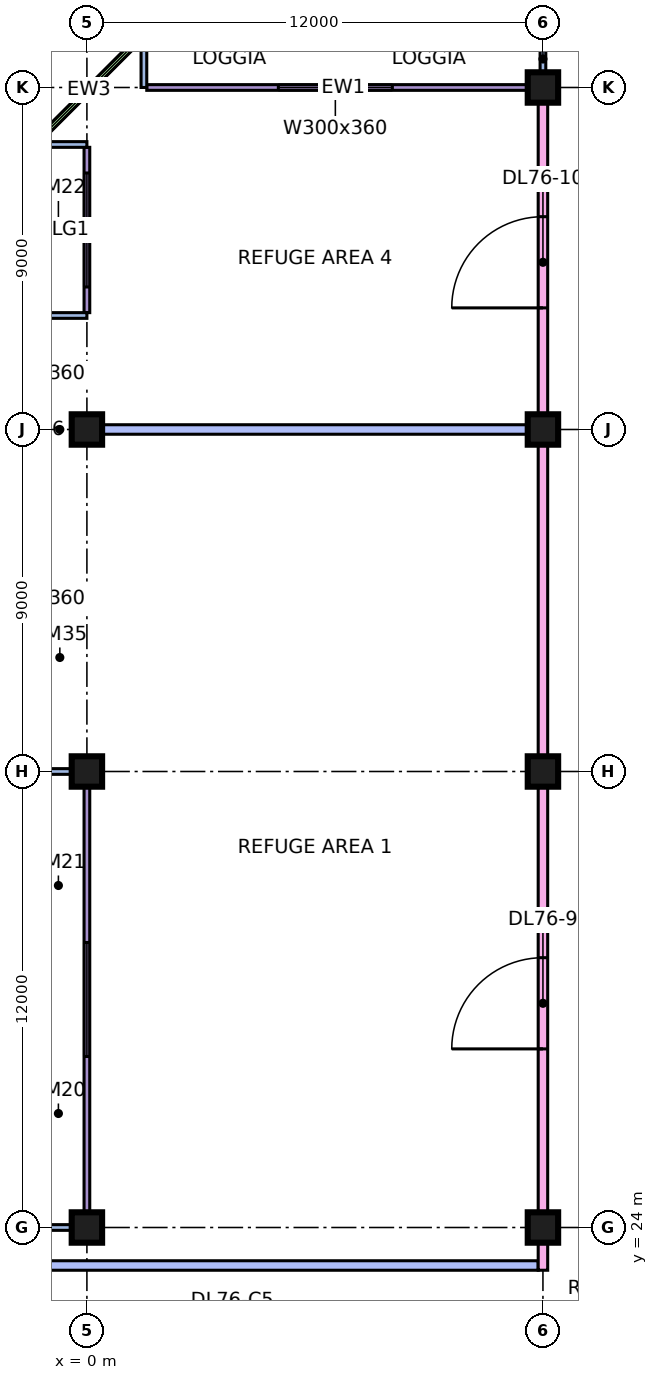
"""IFC4 building model, lengths in metres.
Left out: names, types, materials, properties, quantities, classifications, styles, units other than length and angle.
Written with IfcOpenShell. Run it as: python <this file> out.ifc"""

import sys

from ifc_helpers import new_model, si_unit, direction, frame, frame_2d, origin, origin_2d, place, context, subcontext, project, spatial, rectangle, extrude, element, fill, save


model = new_model("IFC4")
c1 = context("Model", 3, precision=1e-05, world=origin(), true_north=direction((0.0, 1.0)))
c2 = subcontext(c1, "Body", "Model", "MODEL_VIEW")
j1 = project(units=[si_unit("LENGTHUNIT", "METRE"), si_unit("PLANEANGLEUNIT", "RADIAN")], contexts=[c1])
p1 = place(None, origin())
s1 = spatial("IfcSite", under=j1, at=p1, CompositionType="ELEMENT")
p2 = place(p1, origin())
s2 = spatial("IfcBuilding", under=s1, at=p2, CompositionType="ELEMENT")
p3 = place(p2, frame((0.0, 0.0, 322.15)))
s3 = spatial("IfcBuildingStorey", under=s2, at=p3, CompositionType="ELEMENT", Elevation=322.15)
for number, where, z_axis, x_axis in (
    (1, (0.0, 24.0, 0.0), (0.0, 0.0, 1.0), (1.0, 0.0, 0.0)),
    (2, (0.0, 36.0, 0.0), (0.0, 0.0, 1.0), (1.0, 0.0, 0.0)),
):
    element("IfcColumn", number, at=place(p3, frame(where, z_axis=z_axis, x_axis=x_axis)), inside=s3, PredefinedType="COLUMN", context=c2, shape_type="SweptSolid", body=[
        extrude(rectangle(XDim=0.8, YDim=0.8, at=origin_2d()), origin(), (0.0, 0.0, 1.0), 5.5),
    ])
p4 = place(p3, frame((0.0, 45.0, 0.0), z_axis=(0.0, 0.0, 1.0), x_axis=(1.0, 0.0, 0.0)))
e3 = element("IfcColumn", 3, at=p4, inside=s3, PredefinedType="COLUMN", context=c2, shape_type="SweptSolid", body=[
    extrude(rectangle(XDim=0.8, YDim=0.8, at=origin_2d()), origin(), (0.0, 0.0, 1.0), 5.5),
])
for number, where, z_axis, x_axis in (
    (4, (12.0, 24.0, 0.0), (0.0, 0.0, 1.0), (1.0, 0.0, 0.0)),
    (5, (12.0, 36.0, 0.0), (0.0, 0.0, 1.0), (1.0, 0.0, 0.0)),
    (6, (12.0, 45.0, 0.0), (0.0, 0.0, 1.0), (1.0, 0.0, 0.0)),
    (7, (12.0, 54.0, 0.0), (0.0, 0.0, 1.0), (1.0, 0.0, 0.0)),
):
    element("IfcColumn", number, at=place(p3, frame(where, z_axis=z_axis, x_axis=x_axis)), inside=s3, PredefinedType="COLUMN", context=c2, shape_type="SweptSolid", body=[
        extrude(rectangle(XDim=0.8, YDim=0.8, at=origin_2d()), origin(), (0.0, 0.0, 1.0), 5.5),
    ])
p5 = place(p3, frame((11.925, 54.0, 0.0), z_axis=(0.0, 0.0, 1.0), x_axis=(-1.0, 0.0, 0.0)))
e8 = element("IfcWall", 8, at=p5, inside=s3, PredefinedType="SOLIDWALL", context=c2, shape_type="SweptSolid", body=[
    extrude(rectangle(XDim=10.35, YDim=0.15, at=frame_2d((5.175, 0.0))), origin(), (0.0, 0.0, 1.0), 5.05),
])
p6 = place(p5, frame((3.887, 0.0, 0.45)))
e9 = element("IfcOpeningElement", 9, at=p6, cuts=e8, PredefinedType="OPENING", context=c2, shape_type="SweptSolid", body=[
    extrude(rectangle(XDim=3.0, YDim=3.6, at=frame_2d((1.5, 1.8))), frame((0.0, 0.085, 0.0), z_axis=(0.0, -1.0, 0.0), x_axis=(1.0, 0.0, 0.0)), (0.0, 0.0, 1.0), 0.17),
])
for number, where, z_axis, x_axis in (
    (10, (12.0, 55.5, 0.0), (0.0, 0.0, 1.0), (0.0, -1.0, 0.0)),
    (11, (1.5, 55.5, 0.0), (0.0, 0.0, 1.0), (0.0, -1.0, 0.0)),
):
    element("IfcWall", number, at=place(p3, frame(where, z_axis=z_axis, x_axis=x_axis)), inside=s3, PredefinedType="SOLIDWALL", context=c2, shape_type="SweptSolid", body=[
        extrude(rectangle(XDim=1.5, YDim=0.15, at=frame_2d((0.75, 0.0))), origin(), (0.0, 0.0, 1.0), 5.05),
    ])
p7 = place(p3, frame((1.553, 55.447, 0.0), z_axis=(0.0, 0.0, 1.0), x_axis=(-0.707106781187, -0.707106781187, 0.0)))
e12 = element("IfcWall", 12, at=p7, inside=s3, PredefinedType="SOLIDWALL", context=c2, shape_type="SweptSolid", body=[
    extrude(rectangle(XDim=4.243, YDim=0.15, at=frame_2d((2.121, 0.0))), origin(), (0.0, 0.0, 1.0), 5.05),
])
p8 = place(p7, frame((0.621, 0.0, 0.45)))
e13 = element("IfcOpeningElement", 13, at=p8, cuts=e12, PredefinedType="OPENING", context=c2, shape_type="SweptSolid", body=[
    extrude(rectangle(XDim=3.0, YDim=3.6, at=frame_2d((1.5, 1.8))), frame((0.0, 0.085, 0.0), z_axis=(0.0, -1.0, 0.0), x_axis=(1.0, 0.0, 0.0)), (0.0, 0.0, 1.0), 0.17),
])
p9 = place(p3, frame((0.0, 52.425, 0.0), z_axis=(0.0, 0.0, 1.0), x_axis=(0.0, -1.0, 0.0)))
e14 = element("IfcWall", 14, at=p9, inside=s3, PredefinedType="SOLIDWALL", context=c2, shape_type="SweptSolid", body=[
    extrude(rectangle(XDim=4.35, YDim=0.15, at=frame_2d((2.175, 0.0))), origin(), (0.0, 0.0, 1.0), 5.05),
])
p10 = place(p9, frame((0.675, 0.0, 0.45)))
e15 = element("IfcOpeningElement", 15, at=p10, cuts=e14, PredefinedType="OPENING", context=c2, shape_type="SweptSolid", body=[
    extrude(rectangle(XDim=3.0, YDim=3.6, at=frame_2d((1.5, 1.8))), frame((0.0, 0.085, 0.0), z_axis=(0.0, -1.0, 0.0), x_axis=(1.0, 0.0, 0.0)), (0.0, 0.0, 1.0), 0.17),
])
for number, where, z_axis, x_axis in (
    (16, (-1.5, 52.5, 0.0), (0.0, 0.0, 1.0), (1.0, 0.0, 0.0)),
    (17, (-1.5, 48.0, 0.0), (0.0, 0.0, 1.0), (1.0, 0.0, 0.0)),
):
    element("IfcWall", number, at=place(p3, frame(where, z_axis=z_axis, x_axis=x_axis)), inside=s3, PredefinedType="SOLIDWALL", context=c2, shape_type="SweptSolid", body=[
        extrude(rectangle(XDim=1.5, YDim=0.15, at=frame_2d((0.75, 0.0))), origin(), (0.0, 0.0, 1.0), 5.05),
    ])
p11 = place(p3, frame((0.0, 35.925, 0.0), z_axis=(0.0, 0.0, 1.0), x_axis=(0.0, -1.0, 0.0)))
e18 = element("IfcWall", 18, at=p11, inside=s3, PredefinedType="SOLIDWALL", context=c2, shape_type="SweptSolid", body=[
    extrude(rectangle(XDim=11.85, YDim=0.15, at=frame_2d((5.925, 0.0))), origin(), (0.0, 0.0, 1.0), 5.05),
])
p12 = place(p11, frame((4.425, 0.0, 0.45)))
e19 = element("IfcOpeningElement", 19, at=p12, cuts=e18, PredefinedType="OPENING", context=c2, shape_type="SweptSolid", body=[
    extrude(rectangle(XDim=3.0, YDim=3.6, at=frame_2d((1.5, 1.8))), frame((0.0, 0.085, 0.0), z_axis=(0.0, -1.0, 0.0), x_axis=(1.0, 0.0, 0.0)), (0.0, 0.0, 1.0), 0.17),
])
for number, where, z_axis, x_axis in (
    (20, (-1.5, 36.0, 0.0), (0.0, 0.0, 1.0), (1.0, 0.0, 0.0)),
    (21, (-1.5, 24.0, 0.0), (0.0, 0.0, 1.0), (1.0, 0.0, 0.0)),
):
    element("IfcWall", number, at=place(p3, frame(where, z_axis=z_axis, x_axis=x_axis)), inside=s3, PredefinedType="SOLIDWALL", context=c2, shape_type="SweptSolid", body=[
        extrude(rectangle(XDim=1.5, YDim=0.15, at=frame_2d((0.75, 0.0))), origin(), (0.0, 0.0, 1.0), 5.05),
    ])
p13 = place(p3, frame((-1.35, 23.0, 0.0), z_axis=(0.0, 0.0, 1.0), x_axis=(1.0, 0.0, 0.0)))
e22 = element("IfcWall", 22, at=p13, inside=s3, PredefinedType="PARTITIONING", context=c2, shape_type="SweptSolid", body=[
    extrude(rectangle(XDim=13.225, YDim=0.25, at=frame_2d((6.613, 0.0))), origin(), (0.0, 0.0, 1.0), 5.05),
])
e23 = element("IfcWall", 23, at=p4, inside=s3, PredefinedType="PARTITIONING", context=c2, shape_type="SweptSolid", body=[
    extrude(rectangle(XDim=11.875, YDim=0.25, at=frame_2d((5.938, 0.0))), origin(), (0.0, 0.0, 1.0), 5.05),
])
p14 = place(p3, frame((12.0, 22.875, 0.0), z_axis=(0.0, 0.0, 1.0), x_axis=(0.0, 1.0, 0.0)))
e24 = element("IfcWall", 24, at=p14, inside=s3, PredefinedType="PARTITIONING", context=c2, shape_type="SweptSolid", body=[
    extrude(rectangle(XDim=31.125, YDim=0.25, at=frame_2d((15.562, 0.0))), origin(), (0.0, 0.0, 1.0), 2.45),
])
p15 = place(p14, frame((5.825, 0.0, 0.0)))
e25 = element("IfcOpeningElement", 25, at=p15, cuts=e24, PredefinedType="OPENING", context=c2, shape_type="SweptSolid", body=[
    extrude(rectangle(XDim=2.4, YDim=2.1, at=frame_2d((1.2, 1.05))), frame((0.0, 0.135, 0.0), z_axis=(0.0, -1.0, 0.0), x_axis=(1.0, 0.0, 0.0)), (0.0, 0.0, 1.0), 0.27),
])
p16 = place(p14, frame((25.325, 0.0, 0.0)))
e26 = element("IfcOpeningElement", 26, at=p16, cuts=e24, PredefinedType="OPENING", context=c2, shape_type="SweptSolid", body=[
    extrude(rectangle(XDim=2.4, YDim=2.1, at=frame_2d((1.2, 1.05))), frame((0.0, 0.135, 0.0), z_axis=(0.0, -1.0, 0.0), x_axis=(1.0, 0.0, 0.0)), (0.0, 0.0, 1.0), 0.27),
])
p17 = place(p6, origin())
e27 = element("IfcWindow", 27, at=p17, inside=s3, PartitioningType="SINGLE_PANEL", PredefinedType="WINDOW", context=c2, shape_type="SweptSolid", body=[
    extrude(rectangle(XDim=3.0, YDim=3.6, at=frame_2d((1.5, 1.8))), frame((0.0, 0.03, 0.0), z_axis=(0.0, -1.0, 0.0), x_axis=(1.0, 0.0, 0.0)), (0.0, 0.0, 1.0), 0.06),
])
fill(e9, e27)
p18 = place(p8, origin())
e28 = element("IfcWindow", 28, at=p18, inside=s3, PartitioningType="SINGLE_PANEL", PredefinedType="WINDOW", context=c2, shape_type="SweptSolid", body=[
    extrude(rectangle(XDim=3.0, YDim=3.6, at=frame_2d((1.5, 1.8))), frame((0.0, 0.03, 0.0), z_axis=(0.0, -1.0, 0.0), x_axis=(1.0, 0.0, 0.0)), (0.0, 0.0, 1.0), 0.06),
])
fill(e13, e28)
p19 = place(p10, origin())
e29 = element("IfcWindow", 29, at=p19, inside=s3, PartitioningType="SINGLE_PANEL", PredefinedType="WINDOW", context=c2, shape_type="SweptSolid", body=[
    extrude(rectangle(XDim=3.0, YDim=3.6, at=frame_2d((1.5, 1.8))), frame((0.0, 0.03, 0.0), z_axis=(0.0, -1.0, 0.0), x_axis=(1.0, 0.0, 0.0)), (0.0, 0.0, 1.0), 0.06),
])
fill(e15, e29)
p20 = place(p12, origin())
e30 = element("IfcWindow", 30, at=p20, inside=s3, PartitioningType="SINGLE_PANEL", PredefinedType="WINDOW", context=c2, shape_type="SweptSolid", body=[
    extrude(rectangle(XDim=3.0, YDim=3.6, at=frame_2d((1.5, 1.8))), frame((0.0, 0.03, 0.0), z_axis=(0.0, -1.0, 0.0), x_axis=(1.0, 0.0, 0.0)), (0.0, 0.0, 1.0), 0.06),
])
fill(e19, e30)
p21 = place(p15, origin())
e31 = element("IfcDoor", 31, at=p21, inside=s3, OperationType="DOUBLE_DOOR_SINGLE_SWING", PredefinedType="DOOR", context=c2, shape_type="SweptSolid", body=[
    extrude(rectangle(XDim=2.4, YDim=2.1, at=frame_2d((1.2, 1.05))), frame((0.0, 0.025, 0.0), z_axis=(0.0, -1.0, 0.0), x_axis=(1.0, 0.0, 0.0)), (0.0, 0.0, 1.0), 0.05),
])
fill(e25, e31)
p22 = place(p16, origin())
e32 = element("IfcDoor", 32, at=p22, inside=s3, OperationType="DOUBLE_DOOR_SINGLE_SWING", PredefinedType="DOOR", context=c2, shape_type="SweptSolid", body=[
    extrude(rectangle(XDim=2.4, YDim=2.1, at=frame_2d((1.2, 1.05))), frame((0.0, 0.025, 0.0), z_axis=(0.0, -1.0, 0.0), x_axis=(1.0, 0.0, 0.0)), (0.0, 0.0, 1.0), 0.05),
])
fill(e26, e32)
save(model, sys.argv[1])
